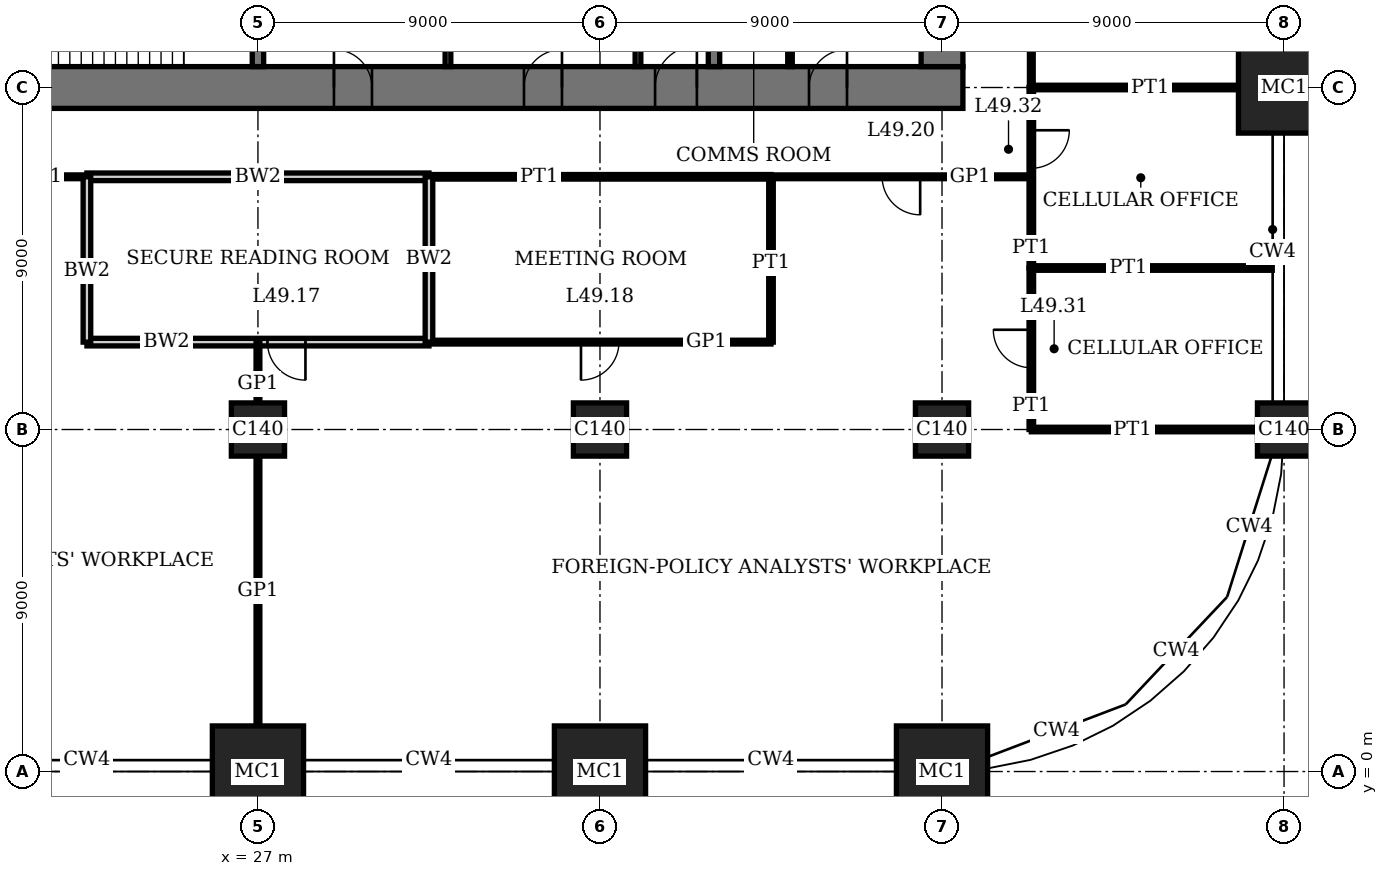
"""IFC4 building model, lengths in metres.
Left out: names, types, materials, properties, quantities, classifications, styles, units other than length and angle.
Written with IfcOpenShell. Run it as: python <this file> out.ifc"""

import sys

from ifc_helpers import new_model, si_unit, direction, frame, frame_2d, origin, origin_2d, place, context, subcontext, project, spatial, rectangle, extrude, element, fill, save


model = new_model("IFC4")
c1 = context("Model", 3, precision=1e-05, world=origin(), true_north=direction((0.0, 1.0)))
c2 = subcontext(c1, "Body", "Model", "MODEL_VIEW")
j1 = project(units=[si_unit("LENGTHUNIT", "METRE"), si_unit("PLANEANGLEUNIT", "RADIAN")], contexts=[c1])
p1 = place(None, origin())
s1 = spatial("IfcSite", under=j1, at=p1, CompositionType="ELEMENT")
p2 = place(p1, origin())
s2 = spatial("IfcBuilding", under=s1, at=p2, CompositionType="ELEMENT")
p3 = place(p2, frame((0.0, 0.0, 202.2)))
s3 = spatial("IfcBuildingStorey", under=s2, at=p3, CompositionType="ELEMENT", Elevation=202.2)
p4 = place(p3, frame((27.0, 0.0, 0.0), z_axis=(0.0, 0.0, 1.0), x_axis=(1.0, 0.0, 0.0)))
e1 = element("IfcColumn", 1, at=p4, inside=s3, PredefinedType="COLUMN", context=c2, shape_type="SweptSolid", body=[
    extrude(rectangle(XDim=2.4, YDim=2.4, at=origin_2d()), origin(), (0.0, 0.0, 1.0), 4.0),
])
p5 = place(p3, frame((27.0, 9.0, 0.0), z_axis=(0.0, 0.0, 1.0), x_axis=(1.0, 0.0, 0.0)))
e2 = element("IfcColumn", 2, at=p5, inside=s3, PredefinedType="COLUMN", context=c2, shape_type="SweptSolid", body=[
    extrude(rectangle(XDim=1.4, YDim=1.4, at=origin_2d()), origin(), (0.0, 0.0, 1.0), 4.0),
])
p6 = place(p3, frame((36.0, 0.0, 0.0), z_axis=(0.0, 0.0, 1.0), x_axis=(1.0, 0.0, 0.0)))
e3 = element("IfcColumn", 3, at=p6, inside=s3, PredefinedType="COLUMN", context=c2, shape_type="SweptSolid", body=[
    extrude(rectangle(XDim=2.4, YDim=2.4, at=origin_2d()), origin(), (0.0, 0.0, 1.0), 4.0),
])
p7 = place(p3, frame((36.0, 9.0, 0.0), z_axis=(0.0, 0.0, 1.0), x_axis=(1.0, 0.0, 0.0)))
e4 = element("IfcColumn", 4, at=p7, inside=s3, PredefinedType="COLUMN", context=c2, shape_type="SweptSolid", body=[
    extrude(rectangle(XDim=1.4, YDim=1.4, at=origin_2d()), origin(), (0.0, 0.0, 1.0), 4.0),
])
p8 = place(p3, frame((45.0, 0.0, 0.0), z_axis=(0.0, 0.0, 1.0), x_axis=(1.0, 0.0, 0.0)))
e5 = element("IfcColumn", 5, at=p8, inside=s3, PredefinedType="COLUMN", context=c2, shape_type="SweptSolid", body=[
    extrude(rectangle(XDim=2.4, YDim=2.4, at=origin_2d()), origin(), (0.0, 0.0, 1.0), 4.0),
])
for number, where, z_axis, x_axis in (
    (6, (45.0, 9.0, 0.0), (0.0, 0.0, 1.0), (1.0, 0.0, 0.0)),
    (7, (54.0, 9.0, 0.0), (0.0, 0.0, 1.0), (1.0, 0.0, 0.0)),
):
    element("IfcColumn", number, at=place(p3, frame(where, z_axis=z_axis, x_axis=x_axis)), inside=s3, PredefinedType="COLUMN", context=c2, shape_type="SweptSolid", body=[
        extrude(rectangle(XDim=1.4, YDim=1.4, at=origin_2d()), origin(), (0.0, 0.0, 1.0), 4.0),
    ])
p9 = place(p3, frame((54.0, 18.0, 0.0), z_axis=(0.0, 0.0, 1.0), x_axis=(1.0, 0.0, 0.0)))
e8 = element("IfcColumn", 8, at=p9, inside=s3, PredefinedType="COLUMN", context=c2, shape_type="SweptSolid", body=[
    extrude(rectangle(XDim=2.4, YDim=2.4, at=origin_2d()), origin(), (0.0, 0.0, 1.0), 4.0),
])
p10 = place(p3, frame((17.45, 18.0, 0.0), z_axis=(0.0, 0.0, 1.0), x_axis=(1.0, 0.0, 0.0)))
e9 = element("IfcWall", 9, at=p10, inside=s3, PredefinedType="SHEAR", context=c2, shape_type="SweptSolid", body=[
    extrude(rectangle(XDim=28.1, YDim=1.1, at=frame_2d((14.05, 0.0))), origin(), (0.0, 0.0, 1.0), 4.0),
])
p11 = place(p10, frame((11.55, 0.0, 0.0)))
e10 = element("IfcOpeningElement", 10, at=p11, cuts=e9, PredefinedType="OPENING", context=c2, shape_type="SweptSolid", body=[
    extrude(rectangle(XDim=1.0, YDim=2.4, at=frame_2d((0.5, 1.2))), frame((0.0, 0.56, 0.0), z_axis=(0.0, -1.0, 0.0), x_axis=(1.0, 0.0, 0.0)), (0.0, 0.0, 1.0), 1.12),
])
p12 = place(p10, frame((16.55, 0.0, 0.0)))
e11 = element("IfcOpeningElement", 11, at=p12, cuts=e9, PredefinedType="OPENING", context=c2, shape_type="SweptSolid", body=[
    extrude(rectangle(XDim=1.0, YDim=2.4, at=frame_2d((0.5, 1.2))), frame((0.0, 0.56, 0.0), z_axis=(0.0, -1.0, 0.0), x_axis=(1.0, 0.0, 0.0)), (0.0, 0.0, 1.0), 1.12),
])
p13 = place(p10, frame((20.0, 0.0, 0.0)))
e12 = element("IfcOpeningElement", 12, at=p13, cuts=e9, PredefinedType="OPENING", context=c2, shape_type="SweptSolid", body=[
    extrude(rectangle(XDim=1.1, YDim=2.4, at=frame_2d((0.55, 1.2))), frame((0.0, 0.56, 0.0), z_axis=(0.0, -1.0, 0.0), x_axis=(1.0, 0.0, 0.0)), (0.0, 0.0, 1.0), 1.12),
])
p14 = place(p10, frame((24.05, 0.0, 0.0)))
e13 = element("IfcOpeningElement", 13, at=p14, cuts=e9, PredefinedType="OPENING", context=c2, shape_type="SweptSolid", body=[
    extrude(rectangle(XDim=1.0, YDim=2.4, at=frame_2d((0.5, 1.2))), frame((0.0, 0.56, 0.0), z_axis=(0.0, -1.0, 0.0), x_axis=(1.0, 0.0, 0.0)), (0.0, 0.0, 1.0), 1.12),
])
p15 = place(p3, frame((45.0, 18.55, 0.0), z_axis=(0.0, 0.0, 1.0), x_axis=(0.0, 1.0, 0.0)))
e14 = element("IfcWall", 14, at=p15, inside=s3, PredefinedType="SHEAR", context=c2, shape_type="SweptSolid", body=[
    extrude(rectangle(XDim=16.9, YDim=1.1, at=frame_2d((8.45, 0.0))), origin(), (0.0, 0.0, 1.0), 4.0),
])
p16 = place(p15, frame((8.45, 0.0, 0.0)))
e15 = element("IfcOpeningElement", 15, at=p16, cuts=e14, PredefinedType="OPENING", context=c2, shape_type="SweptSolid", body=[
    extrude(rectangle(XDim=1.8, YDim=2.4, at=frame_2d((0.9, 1.2))), frame((0.0, 0.56, 0.0), z_axis=(0.0, -1.0, 0.0), x_axis=(1.0, 0.0, 0.0)), (0.0, 0.0, 1.0), 1.12),
])
p17 = place(p3, frame((27.0, 18.55, 0.0), z_axis=(0.0, 0.0, 1.0), x_axis=(0.0, 1.0, 0.0)))
e16 = element("IfcWall", 16, at=p17, inside=s3, PredefinedType="SHEAR", context=c2, shape_type="SweptSolid", body=[
    extrude(rectangle(XDim=3.05, YDim=0.3, at=frame_2d((1.525, 0.0))), origin(), (0.0, 0.0, 1.0), 4.0),
])
p18 = place(p3, frame((39.0, 18.55, 0.0), z_axis=(0.0, 0.0, 1.0), x_axis=(0.0, 1.0, 0.0)))
e17 = element("IfcWall", 17, at=p18, inside=s3, PredefinedType="SHEAR", context=c2, shape_type="SweptSolid", body=[
    extrude(rectangle(XDim=5.9, YDim=0.3, at=frame_2d((2.95, 0.0))), origin(), (0.0, 0.0, 1.0), 4.0),
])
p19 = place(p3, frame((47.35, 9.0, 0.0), z_axis=(0.0, 0.0, 1.0), x_axis=(1.0, 0.0, 0.0)))
e18 = element("IfcWall", 18, at=p19, inside=s3, PredefinedType="PARTITIONING", context=c2, shape_type="SweptSolid", body=[
    extrude(rectangle(XDim=5.95, YDim=0.12, at=frame_2d((2.975, 0.0))), origin(), (0.0, 0.0, 1.0), 3.05),
])
p20 = place(p3, frame((22.5, 11.3, 0.0), z_axis=(0.0, 0.0, 1.0), x_axis=(1.0, 0.0, 0.0)))
e19 = element("IfcWall", 19, at=p20, inside=s3, PredefinedType="SOLIDWALL", context=c2, shape_type="SweptSolid", body=[
    extrude(rectangle(XDim=9.0, YDim=0.2, at=frame_2d((4.5, 0.0))), origin(), (0.0, 0.0, 1.0), 3.75),
])
p21 = place(p20, frame((4.75, 0.0, 0.0)))
e20 = element("IfcOpeningElement", 20, at=p21, cuts=e19, PredefinedType="OPENING", context=c2, shape_type="SweptSolid", body=[
    extrude(rectangle(XDim=1.0, YDim=2.4, at=frame_2d((0.5, 1.2))), frame((0.0, 0.11, 0.0), z_axis=(0.0, -1.0, 0.0), x_axis=(1.0, 0.0, 0.0)), (0.0, 0.0, 1.0), 0.22),
])
p22 = place(p3, frame((31.5, 11.3, 0.0), z_axis=(0.0, 0.0, 1.0), x_axis=(1.0, 0.0, 0.0)))
e21 = element("IfcWall", 21, at=p22, inside=s3, PredefinedType="PARTITIONING", context=c2, shape_type="SweptSolid", body=[
    extrude(rectangle(XDim=9.0, YDim=0.1, at=frame_2d((4.5, 0.0))), origin(), (0.0, 0.0, 1.0), 3.75),
])
p23 = place(p22, frame((4.0, 0.0, 0.0)))
e22 = element("IfcOpeningElement", 22, at=p23, cuts=e21, PredefinedType="OPENING", context=c2, shape_type="SweptSolid", body=[
    extrude(rectangle(XDim=1.0, YDim=2.4, at=frame_2d((0.5, 1.2))), frame((0.0, 0.06, 0.0), z_axis=(0.0, -1.0, 0.0), x_axis=(1.0, 0.0, 0.0)), (0.0, 0.0, 1.0), 0.12),
])
p24 = place(p3, frame((47.35, 13.25, 0.0), z_axis=(0.0, 0.0, 1.0), x_axis=(1.0, 0.0, 0.0)))
e23 = element("IfcWall", 23, at=p24, inside=s3, PredefinedType="PARTITIONING", context=c2, shape_type="SweptSolid", body=[
    extrude(rectangle(XDim=6.34, YDim=0.12, at=frame_2d((3.17, 0.0))), origin(), (0.0, 0.0, 1.0), 3.1),
])
p25 = place(p3, frame((22.5, 15.65, 0.0), z_axis=(0.0, 0.0, 1.0), x_axis=(1.0, 0.0, 0.0)))
e24 = element("IfcWall", 24, at=p25, inside=s3, PredefinedType="SOLIDWALL", context=c2, shape_type="SweptSolid", body=[
    extrude(rectangle(XDim=9.0, YDim=0.2, at=frame_2d((4.5, 0.0))), origin(), (0.0, 0.0, 1.0), 3.75),
])
p26 = place(p3, frame((31.5, 15.65, 0.0), z_axis=(0.0, 0.0, 1.0), x_axis=(1.0, 0.0, 0.0)))
e25 = element("IfcWall", 25, at=p26, inside=s3, PredefinedType="PARTITIONING", context=c2, shape_type="SweptSolid", body=[
    extrude(rectangle(XDim=9.0, YDim=0.12, at=frame_2d((4.5, 0.0))), origin(), (0.0, 0.0, 1.0), 3.75),
])
p27 = place(p3, frame((15.65, 15.65, 0.0), z_axis=(0.0, 0.0, 1.0), x_axis=(1.0, 0.0, 0.0)))
e26 = element("IfcWall", 26, at=p27, inside=s3, PredefinedType="PARTITIONING", context=c2, shape_type="SweptSolid", body=[
    extrude(rectangle(XDim=6.85, YDim=0.1, at=frame_2d((3.425, 0.0))), origin(), (0.0, 0.0, 1.0), 3.75),
])
p28 = place(p27, frame((2.925, 0.0, 0.0)))
e27 = element("IfcOpeningElement", 27, at=p28, cuts=e26, PredefinedType="OPENING", context=c2, shape_type="SweptSolid", body=[
    extrude(rectangle(XDim=1.0, YDim=2.4, at=frame_2d((0.5, 1.2))), frame((0.0, 0.06, 0.0), z_axis=(0.0, -1.0, 0.0), x_axis=(1.0, 0.0, 0.0)), (0.0, 0.0, 1.0), 0.12),
])
p29 = place(p3, frame((40.5, 15.65, 0.0), z_axis=(0.0, 0.0, 1.0), x_axis=(1.0, 0.0, 0.0)))
e28 = element("IfcWall", 28, at=p29, inside=s3, PredefinedType="PARTITIONING", context=c2, shape_type="SweptSolid", body=[
    extrude(rectangle(XDim=6.85, YDim=0.1, at=frame_2d((3.425, 0.0))), origin(), (0.0, 0.0, 1.0), 3.75),
])
p30 = place(p29, frame((2.925, 0.0, 0.0)))
e29 = element("IfcOpeningElement", 29, at=p30, cuts=e28, PredefinedType="OPENING", context=c2, shape_type="SweptSolid", body=[
    extrude(rectangle(XDim=1.0, YDim=2.4, at=frame_2d((0.5, 1.2))), frame((0.0, 0.06, 0.0), z_axis=(0.0, -1.0, 0.0), x_axis=(1.0, 0.0, 0.0)), (0.0, 0.0, 1.0), 0.12),
])
p31 = place(p3, frame((47.35, 18.0, 0.0), z_axis=(0.0, 0.0, 1.0), x_axis=(1.0, 0.0, 0.0)))
e30 = element("IfcWall", 30, at=p31, inside=s3, PredefinedType="PARTITIONING", context=c2, shape_type="SweptSolid", body=[
    extrude(rectangle(XDim=5.45, YDim=0.12, at=frame_2d((2.725, 0.0))), origin(), (0.0, 0.0, 1.0), 3.05),
])
p32 = place(p3, frame((22.5, 11.3, 0.0), z_axis=(0.0, 0.0, 1.0), x_axis=(0.0, 1.0, 0.0)))
e31 = element("IfcWall", 31, at=p32, inside=s3, PredefinedType="SOLIDWALL", context=c2, shape_type="SweptSolid", body=[
    extrude(rectangle(XDim=4.35, YDim=0.2, at=frame_2d((2.175, 0.0))), origin(), (0.0, 0.0, 1.0), 3.75),
])
p33 = place(p3, frame((27.0, 1.2, 0.0), z_axis=(0.0, 0.0, 1.0), x_axis=(0.0, 1.0, 0.0)))
e32 = element("IfcWall", 32, at=p33, inside=s3, PredefinedType="PARTITIONING", context=c2, shape_type="SweptSolid", body=[
    extrude(rectangle(XDim=7.1, YDim=0.1, at=frame_2d((3.55, 0.0))), origin(), (0.0, 0.0, 1.0), 3.05),
])
p34 = place(p3, frame((27.0, 9.7, 0.0), z_axis=(0.0, 0.0, 1.0), x_axis=(0.0, 1.0, 0.0)))
e33 = element("IfcWall", 33, at=p34, inside=s3, PredefinedType="PARTITIONING", context=c2, shape_type="SweptSolid", body=[
    extrude(rectangle(XDim=1.61, YDim=0.1, at=frame_2d((0.805, 0.0))), origin(), (0.0, 0.0, 1.0), 3.05),
])
p35 = place(p3, frame((31.5, 11.3, 0.0), z_axis=(0.0, 0.0, 1.0), x_axis=(0.0, 1.0, 0.0)))
e34 = element("IfcWall", 34, at=p35, inside=s3, PredefinedType="SOLIDWALL", context=c2, shape_type="SweptSolid", body=[
    extrude(rectangle(XDim=4.35, YDim=0.2, at=frame_2d((2.175, 0.0))), origin(), (0.0, 0.0, 1.0), 3.75),
])
p36 = place(p3, frame((40.5, 11.3, 0.0), z_axis=(0.0, 0.0, 1.0), x_axis=(0.0, 1.0, 0.0)))
e35 = element("IfcWall", 35, at=p36, inside=s3, PredefinedType="PARTITIONING", context=c2, shape_type="SweptSolid", body=[
    extrude(rectangle(XDim=4.35, YDim=0.12, at=frame_2d((2.175, 0.0))), origin(), (0.0, 0.0, 1.0), 3.75),
])
p37 = place(p3, frame((47.35, 9.0, 0.0), z_axis=(0.0, 0.0, 1.0), x_axis=(0.0, 1.0, 0.0)))
e36 = element("IfcWall", 36, at=p37, inside=s3, PredefinedType="PARTITIONING", context=c2, shape_type="SweptSolid", body=[
    extrude(rectangle(XDim=4.25, YDim=0.12, at=frame_2d((2.125, 0.0))), origin(), (0.0, 0.0, 1.0), 3.75),
])
p38 = place(p37, frame((1.625, 0.0, 0.0)))
e37 = element("IfcOpeningElement", 37, at=p38, cuts=e36, PredefinedType="OPENING", context=c2, shape_type="SweptSolid", body=[
    extrude(rectangle(XDim=1.0, YDim=2.4, at=frame_2d((0.5, 1.2))), frame((0.0, 0.07, 0.0), z_axis=(0.0, -1.0, 0.0), x_axis=(1.0, 0.0, 0.0)), (0.0, 0.0, 1.0), 0.14),
])
p39 = place(p3, frame((47.35, 13.25, 0.0), z_axis=(0.0, 0.0, 1.0), x_axis=(0.0, 1.0, 0.0)))
e38 = element("IfcWall", 38, at=p39, inside=s3, PredefinedType="PARTITIONING", context=c2, shape_type="SweptSolid", body=[
    extrude(rectangle(XDim=4.75, YDim=0.12, at=frame_2d((2.375, 0.0))), origin(), (0.0, 0.0, 1.0), 3.75),
])
p40 = place(p39, frame((2.625, 0.0, 0.0)))
e39 = element("IfcOpeningElement", 39, at=p40, cuts=e38, PredefinedType="OPENING", context=c2, shape_type="SweptSolid", body=[
    extrude(rectangle(XDim=1.0, YDim=2.4, at=frame_2d((0.5, 1.2))), frame((0.0, 0.07, 0.0), z_axis=(0.0, -1.0, 0.0), x_axis=(1.0, 0.0, 0.0)), (0.0, 0.0, 1.0), 0.14),
])
p41 = place(p3, frame((47.35, 18.0, 0.0), z_axis=(0.0, 0.0, 1.0), x_axis=(0.0, 1.0, 0.0)))
e40 = element("IfcWall", 40, at=p41, inside=s3, PredefinedType="PARTITIONING", context=c2, shape_type="SweptSolid", body=[
    extrude(rectangle(XDim=9.0, YDim=0.1, at=frame_2d((4.5, 0.0))), origin(), (0.0, 0.0, 1.0), 3.75),
])
p42 = place(p41, frame((4.0, 0.0, 0.0)))
e41 = element("IfcOpeningElement", 41, at=p42, cuts=e40, PredefinedType="OPENING", context=c2, shape_type="SweptSolid", body=[
    extrude(rectangle(XDim=1.0, YDim=2.4, at=frame_2d((0.5, 1.2))), frame((0.0, 0.06, 0.0), z_axis=(0.0, -1.0, 0.0), x_axis=(1.0, 0.0, 0.0)), (0.0, 0.0, 1.0), 0.12),
])
for number, where, z_axis, x_axis in (
    (42, (32.0, 18.55, 0.0), (0.0, 0.0, 1.0), (0.0, 1.0, 0.0)),
    (43, (37.0, 18.55, 0.0), (0.0, 0.0, 1.0), (0.0, 1.0, 0.0)),
):
    element("IfcWall", number, at=place(p3, frame(where, z_axis=z_axis, x_axis=x_axis)), inside=s3, PredefinedType="PARTITIONING", context=c2, shape_type="SweptSolid", body=[
        extrude(rectangle(XDim=2.9, YDim=0.15, at=frame_2d((1.45, 0.0))), origin(), (0.0, 0.0, 1.0), 3.75),
    ])
p43 = place(p3, frame((41.0, 18.55, 0.0), z_axis=(0.0, 0.0, 1.0), x_axis=(0.0, 1.0, 0.0)))
e44 = element("IfcWall", 44, at=p43, inside=s3, PredefinedType="PARTITIONING", context=c2, shape_type="SweptSolid", body=[
    extrude(rectangle(XDim=2.9, YDim=0.12, at=frame_2d((1.45, 0.0))), origin(), (0.0, 0.0, 1.0), 3.75),
])
p44 = place(p43, frame((0.95, 0.0, 0.0)))
e45 = element("IfcOpeningElement", 45, at=p44, cuts=e44, PredefinedType="OPENING", context=c2, shape_type="SweptSolid", body=[
    extrude(rectangle(XDim=1.0, YDim=2.4, at=frame_2d((0.5, 1.2))), frame((0.0, 0.07, 0.0), z_axis=(0.0, -1.0, 0.0), x_axis=(1.0, 0.0, 0.0)), (0.0, 0.0, 1.0), 0.14),
])
p45 = place(p11, origin())
e46 = element("IfcDoor", 46, at=p45, inside=s3, OperationType="SINGLE_SWING_RIGHT", PredefinedType="DOOR", context=c2, shape_type="SweptSolid", body=[
    extrude(rectangle(XDim=1.0, YDim=2.4, at=frame_2d((0.5, 1.2))), frame((0.0, 0.025, 0.0), z_axis=(0.0, -1.0, 0.0), x_axis=(1.0, 0.0, 0.0)), (0.0, 0.0, 1.0), 0.05),
    extrude(rectangle(XDim=0.04, YDim=2.4, at=frame_2d((0.02, 1.2))), frame((0.0, 0.4, 0.0), z_axis=(0.0, -1.0, 0.0), x_axis=(1.0, 0.0, 0.0)), (0.0, 0.0, 1.0), 0.8),
    extrude(rectangle(XDim=0.04, YDim=2.4, at=frame_2d((0.98, 1.2))), frame((0.0, 0.4, 0.0), z_axis=(0.0, -1.0, 0.0), x_axis=(1.0, 0.0, 0.0)), (0.0, 0.0, 1.0), 0.8),
    extrude(rectangle(XDim=1.0, YDim=0.04, at=frame_2d((0.5, 2.38))), frame((0.0, 0.4, 0.0), z_axis=(0.0, -1.0, 0.0), x_axis=(1.0, 0.0, 0.0)), (0.0, 0.0, 1.0), 0.8),
])
fill(e10, e46)
p46 = place(p12, origin())
e47 = element("IfcDoor", 47, at=p46, inside=s3, OperationType="SINGLE_SWING_LEFT", PredefinedType="DOOR", context=c2, shape_type="SweptSolid", body=[
    extrude(rectangle(XDim=1.0, YDim=2.4, at=frame_2d((0.5, 1.2))), frame((0.0, 0.025, 0.0), z_axis=(0.0, -1.0, 0.0), x_axis=(1.0, 0.0, 0.0)), (0.0, 0.0, 1.0), 0.05),
    extrude(rectangle(XDim=0.04, YDim=2.4, at=frame_2d((0.02, 1.2))), frame((0.0, 0.4, 0.0), z_axis=(0.0, -1.0, 0.0), x_axis=(1.0, 0.0, 0.0)), (0.0, 0.0, 1.0), 0.8),
    extrude(rectangle(XDim=0.04, YDim=2.4, at=frame_2d((0.98, 1.2))), frame((0.0, 0.4, 0.0), z_axis=(0.0, -1.0, 0.0), x_axis=(1.0, 0.0, 0.0)), (0.0, 0.0, 1.0), 0.8),
    extrude(rectangle(XDim=1.0, YDim=0.04, at=frame_2d((0.5, 2.38))), frame((0.0, 0.4, 0.0), z_axis=(0.0, -1.0, 0.0), x_axis=(1.0, 0.0, 0.0)), (0.0, 0.0, 1.0), 0.8),
])
fill(e11, e47)
p47 = place(p13, origin())
e48 = element("IfcDoor", 48, at=p47, inside=s3, OperationType="SINGLE_SWING_LEFT", PredefinedType="DOOR", context=c2, shape_type="SweptSolid", body=[
    extrude(rectangle(XDim=1.1, YDim=2.4, at=frame_2d((0.55, 1.2))), frame((0.0, 0.025, 0.0), z_axis=(0.0, -1.0, 0.0), x_axis=(1.0, 0.0, 0.0)), (0.0, 0.0, 1.0), 0.05),
    extrude(rectangle(XDim=0.04, YDim=2.4, at=frame_2d((0.02, 1.2))), frame((0.0, 0.44, 0.0), z_axis=(0.0, -1.0, 0.0), x_axis=(1.0, 0.0, 0.0)), (0.0, 0.0, 1.0), 0.88),
    extrude(rectangle(XDim=0.04, YDim=2.4, at=frame_2d((1.08, 1.2))), frame((0.0, 0.44, 0.0), z_axis=(0.0, -1.0, 0.0), x_axis=(1.0, 0.0, 0.0)), (0.0, 0.0, 1.0), 0.88),
    extrude(rectangle(XDim=1.1, YDim=0.04, at=frame_2d((0.55, 2.38))), frame((0.0, 0.44, 0.0), z_axis=(0.0, -1.0, 0.0), x_axis=(1.0, 0.0, 0.0)), (0.0, 0.0, 1.0), 0.88),
])
fill(e12, e48)
p48 = place(p14, origin())
e49 = element("IfcDoor", 49, at=p48, inside=s3, OperationType="SINGLE_SWING_LEFT", PredefinedType="DOOR", context=c2, shape_type="SweptSolid", body=[
    extrude(rectangle(XDim=1.0, YDim=2.4, at=frame_2d((0.5, 1.2))), frame((0.0, 0.025, 0.0), z_axis=(0.0, -1.0, 0.0), x_axis=(1.0, 0.0, 0.0)), (0.0, 0.0, 1.0), 0.05),
    extrude(rectangle(XDim=0.04, YDim=2.4, at=frame_2d((0.02, 1.2))), frame((0.0, 0.4, 0.0), z_axis=(0.0, -1.0, 0.0), x_axis=(1.0, 0.0, 0.0)), (0.0, 0.0, 1.0), 0.8),
    extrude(rectangle(XDim=0.04, YDim=2.4, at=frame_2d((0.98, 1.2))), frame((0.0, 0.4, 0.0), z_axis=(0.0, -1.0, 0.0), x_axis=(1.0, 0.0, 0.0)), (0.0, 0.0, 1.0), 0.8),
    extrude(rectangle(XDim=1.0, YDim=0.04, at=frame_2d((0.5, 2.38))), frame((0.0, 0.4, 0.0), z_axis=(0.0, -1.0, 0.0), x_axis=(1.0, 0.0, 0.0)), (0.0, 0.0, 1.0), 0.8),
])
fill(e13, e49)
p49 = place(p21, origin())
e50 = element("IfcDoor", 50, at=p49, inside=s3, OperationType="SINGLE_SWING_RIGHT", PredefinedType="DOOR", context=c2, shape_type="SweptSolid", body=[
    extrude(rectangle(XDim=1.0, YDim=2.4, at=frame_2d((0.5, 1.2))), frame((0.0, 0.035, 0.0), z_axis=(0.0, -1.0, 0.0), x_axis=(1.0, 0.0, 0.0)), (0.0, 0.0, 1.0), 0.07),
])
fill(e20, e50)
p50 = place(p23, origin())
e51 = element("IfcDoor", 51, at=p50, inside=s3, OperationType="SINGLE_SWING_LEFT", PredefinedType="DOOR", context=c2, shape_type="SweptSolid", body=[
    extrude(rectangle(XDim=1.0, YDim=2.4, at=frame_2d((0.5, 1.2))), frame((0.0, 0.02, 0.0), z_axis=(0.0, -1.0, 0.0), x_axis=(1.0, 0.0, 0.0)), (0.0, 0.0, 1.0), 0.04),
])
fill(e22, e51)
p51 = place(p30, origin())
e52 = element("IfcDoor", 52, at=p51, inside=s3, OperationType="SINGLE_SWING_RIGHT", PredefinedType="DOOR", context=c2, shape_type="SweptSolid", body=[
    extrude(rectangle(XDim=1.0, YDim=2.4, at=frame_2d((0.5, 1.2))), frame((0.0, 0.02, 0.0), z_axis=(0.0, -1.0, 0.0), x_axis=(1.0, 0.0, 0.0)), (0.0, 0.0, 1.0), 0.04),
])
fill(e29, e52)
p52 = place(p38, origin())
e53 = element("IfcDoor", 53, at=p52, inside=s3, OperationType="SINGLE_SWING_LEFT", PredefinedType="DOOR", context=c2, shape_type="SweptSolid", body=[
    extrude(rectangle(XDim=1.0, YDim=2.4, at=frame_2d((0.5, 1.2))), frame((0.0, 0.025, 0.0), z_axis=(0.0, -1.0, 0.0), x_axis=(1.0, 0.0, 0.0)), (0.0, 0.0, 1.0), 0.05),
])
fill(e37, e53)
p53 = place(p40, origin())
e54 = element("IfcDoor", 54, at=p53, inside=s3, OperationType="SINGLE_SWING_RIGHT", PredefinedType="DOOR", context=c2, shape_type="SweptSolid", body=[
    extrude(rectangle(XDim=1.0, YDim=2.4, at=frame_2d((0.5, 1.2))), frame((0.0, 0.025, 0.0), z_axis=(0.0, -1.0, 0.0), x_axis=(1.0, 0.0, 0.0)), (0.0, 0.0, 1.0), 0.05),
])
fill(e39, e54)
save(model, sys.argv[1])
